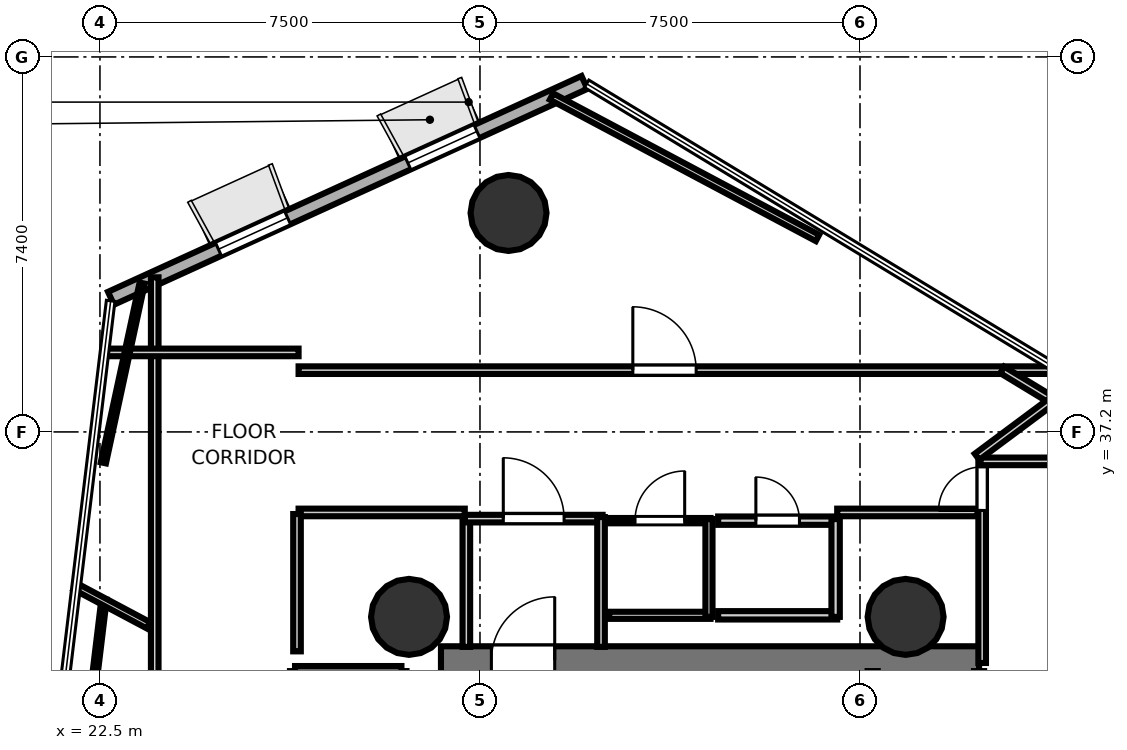
"""IFC4 building model, lengths in metres.
Left out: names, types, materials, properties, quantities, classifications, styles, units other than length and angle.
Written with IfcOpenShell. Run it as: python <this file> out.ifc"""

import sys

from ifc_helpers import new_model, si_unit, direction, frame, frame_2d, origin, origin_2d, place, context, subcontext, project, spatial, rectangle, hollow_circle, extrude, element, fill, save


model = new_model("IFC4")
c1 = context("Model", 3, precision=1e-05, world=origin(), true_north=direction((0.0, 1.0)))
c2 = subcontext(c1, "Body", "Model", "MODEL_VIEW")
j1 = project(units=[si_unit("LENGTHUNIT", "METRE"), si_unit("PLANEANGLEUNIT", "RADIAN")], contexts=[c1])
p1 = place(None, origin())
s1 = spatial("IfcSite", under=j1, at=p1, CompositionType="ELEMENT")
p2 = place(p1, origin())
s2 = spatial("IfcBuilding", under=s1, at=p2, CompositionType="ELEMENT")
p3 = place(p2, frame((0.0, 0.0, 116.3)))
s3 = spatial("IfcBuildingStorey", under=s2, at=p3, CompositionType="ELEMENT", Elevation=116.3)
p4 = place(p3, frame((29.23, 32.695, 0.0), z_axis=(0.0, 0.0, 1.0), x_axis=(1.0, 0.0, 0.0)))
e1 = element("IfcWall", 1, at=p4, inside=s3, PredefinedType="SHEAR", context=c2, shape_type="SweptSolid", body=[
    extrude(rectangle(XDim=10.62, YDim=0.55, at=frame_2d((5.31, 0.0))), origin(), (0.0, 0.0, 1.0), 3.52),
])
p5 = place(p4, frame((0.995, 0.0, 0.0)))
e2 = element("IfcOpeningElement", 2, at=p5, cuts=e1, PredefinedType="OPENING", context=c2, shape_type="SweptSolid", body=[
    extrude(rectangle(XDim=1.25, YDim=2.15, at=frame_2d((0.625, 1.075))), frame((0.0, 0.285, 0.0), z_axis=(0.0, -1.0, 0.0), x_axis=(1.0, 0.0, 0.0)), (0.0, 0.0, 1.0), 0.57),
])
for number, where, z_axis, x_axis in (
    (3, (28.6, 33.55, 0.0), (0.0, 0.0, 1.0), (1.0, 0.0, 0.0)),
    (4, (38.4, 33.55, 0.0), (0.0, 0.0, 1.0), (1.0, 0.0, 0.0)),
    (5, (30.564, 41.521, 0.0), (0.0, 0.0, 1.0), (1.0, 0.0, 0.0)),
):
    element("IfcColumn", number, at=place(p3, frame(where, z_axis=z_axis, x_axis=x_axis)), inside=s3, PredefinedType="COLUMN", context=c2, shape_type="SweptSolid", body=[
        extrude(hollow_circle(Radius=0.75, WallThickness=0.036, at=origin_2d()), origin(), (0.0, 0.0, 1.0), 3.7),
    ])
p6 = place(p3, frame((32.062, 44.097, 0.0), z_axis=(0.0, 0.0, 1.0), x_axis=(-0.909919805149, -0.414784218838, 0.0)))
e6 = element("IfcWall", 6, at=p6, inside=s3, PredefinedType="SOLIDWALL", context=c2, shape_type="SweptSolid", body=[
    extrude(rectangle(XDim=10.27, YDim=0.28, at=frame_2d((5.135, 0.0))), origin(), (0.0, 0.0, 1.0), 3.52),
])
p7 = place(p6, frame((2.331, 0.0, 0.85)))
e7 = element("IfcOpeningElement", 7, at=p7, cuts=e6, PredefinedType="OPENING", context=c2, shape_type="SweptSolid", body=[
    extrude(rectangle(XDim=1.5, YDim=2.1, at=frame_2d((0.75, 1.05))), frame((0.0, 0.15, 0.0), z_axis=(0.0, -1.0, 0.0), x_axis=(1.0, 0.0, 0.0)), (0.0, 0.0, 1.0), 0.3),
])
p8 = place(p6, frame((6.439, 0.0, 0.85)))
e8 = element("IfcOpeningElement", 8, at=p8, cuts=e6, PredefinedType="OPENING", context=c2, shape_type="SweptSolid", body=[
    extrude(rectangle(XDim=1.5, YDim=2.1, at=frame_2d((0.75, 1.05))), frame((0.0, 0.15, 0.0), z_axis=(0.0, -1.0, 0.0), x_axis=(1.0, 0.0, 0.0)), (0.0, 0.0, 1.0), 0.3),
])
p9 = place(p3, frame((26.35, 32.48, 0.0), z_axis=(0.0, 0.0, 1.0), x_axis=(1.0, 0.0, 0.0)))
e9 = element("IfcWall", 9, at=p9, inside=s3, PredefinedType="SOLIDWALL", context=c2, shape_type="SweptSolid", body=[
    extrude(rectangle(XDim=2.1, YDim=0.2, at=frame_2d((1.05, 0.0))), origin(), (0.0, 0.0, 1.0), 3.52),
])
p10 = place(p3, frame((29.731, 32.958, 0.0), z_axis=(0.0, 0.0, 1.0), x_axis=(0.0, 1.0, 0.0)))
e10 = element("IfcWall", 10, at=p10, inside=s3, PredefinedType="PARTITIONING", context=c2, shape_type="SweptSolid", body=[
    extrude(rectangle(XDim=2.562, YDim=0.15, at=frame_2d((1.281, 0.0))), origin(), (0.0, 0.0, 1.0), 2.84),
])
p11 = place(p3, frame((29.7, 35.489, 0.0), z_axis=(0.0, 0.0, 1.0), x_axis=(1.0, 0.0, 0.0)))
e11 = element("IfcWall", 11, at=p11, inside=s3, PredefinedType="PARTITIONING", context=c2, shape_type="SweptSolid", body=[
    extrude(rectangle(XDim=2.72, YDim=0.15, at=frame_2d((1.36, 0.0))), origin(), (0.0, 0.0, 1.0), 2.84),
])
p12 = place(p11, frame((0.76, 0.0, 0.0)))
e12 = element("IfcOpeningElement", 12, at=p12, cuts=e11, PredefinedType="OPENING", context=c2, shape_type="SweptSolid", body=[
    extrude(rectangle(XDim=1.2, YDim=2.15, at=frame_2d((0.6, 1.075))), frame((0.0, 0.085, 0.0), z_axis=(0.0, -1.0, 0.0), x_axis=(1.0, 0.0, 0.0)), (0.0, 0.0, 1.0), 0.17),
])
p13 = place(p3, frame((32.389, 35.52, 0.0), z_axis=(0.0, 0.0, 1.0), x_axis=(0.0, -1.0, 0.0)))
e13 = element("IfcWall", 13, at=p13, inside=s3, PredefinedType="PARTITIONING", context=c2, shape_type="SweptSolid", body=[
    extrude(rectangle(XDim=2.562, YDim=0.15, at=frame_2d((1.281, 0.0))), origin(), (0.0, 0.0, 1.0), 2.84),
])
p14 = place(p3, frame((39.911, 32.64, 0.0), z_axis=(0.0, 0.0, 1.0), x_axis=(0.0, 1.0, 0.0)))
e14 = element("IfcWall", 14, at=p14, inside=s3, PredefinedType="PARTITIONING", context=c2, shape_type="SweptSolid", body=[
    extrude(rectangle(XDim=4.01, YDim=0.15, at=frame_2d((2.005, 0.0))), origin(), (0.0, 0.0, 1.0), 2.84),
])
p15 = place(p14, frame((3.01, 0.0, 0.0)))
e15 = element("IfcOpeningElement", 15, at=p15, cuts=e14, PredefinedType="OPENING", context=c2, shape_type="SweptSolid", body=[
    extrude(rectangle(XDim=0.86, YDim=2.05, at=frame_2d((0.43, 1.025))), frame((0.0, 0.085, 0.0), z_axis=(0.0, -1.0, 0.0), x_axis=(1.0, 0.0, 0.0)), (0.0, 0.0, 1.0), 0.17),
])
p16 = place(p3, frame((39.88, 36.619, 0.0), z_axis=(0.0, 0.0, 1.0), x_axis=(1.0, 0.0, 0.0)))
e16 = element("IfcWall", 16, at=p16, inside=s3, PredefinedType="PARTITIONING", context=c2, shape_type="SweptSolid", body=[
    extrude(rectangle(XDim=4.533, YDim=0.15, at=frame_2d((2.267, 0.0))), origin(), (0.0, 0.0, 1.0), 2.84),
])
p17 = place(p3, frame((34.55, 33.581, 0.0), z_axis=(0.0, 0.0, 1.0), x_axis=(-1.0, 0.0, 0.0)))
e17 = element("IfcWall", 17, at=p17, inside=s3, PredefinedType="PARTITIONING", context=c2, shape_type="SweptSolid", body=[
    extrude(rectangle(XDim=2.0, YDim=0.14, at=frame_2d((1.0, 0.0))), origin(), (0.0, 0.0, 1.0), 2.84),
])
p18 = place(p3, frame((32.55, 35.449, 0.0), z_axis=(0.0, 0.0, 1.0), x_axis=(1.0, 0.0, 0.0)))
e18 = element("IfcWall", 18, at=p18, inside=s3, PredefinedType="PARTITIONING", context=c2, shape_type="SweptSolid", body=[
    extrude(rectangle(XDim=2.0, YDim=0.105, at=frame_2d((1.0, 0.0))), origin(), (0.0, 0.0, 1.0), 2.84),
])
p19 = place(p18, frame((0.51, 0.0, 0.0)))
e19 = element("IfcOpeningElement", 19, at=p19, cuts=e18, PredefinedType="OPENING", context=c2, shape_type="SweptSolid", body=[
    extrude(rectangle(XDim=0.98, YDim=2.1, at=frame_2d((0.49, 1.05))), frame((0.0, 0.062, 0.0), z_axis=(0.0, -1.0, 0.0), x_axis=(1.0, 0.0, 0.0)), (0.0, 0.0, 1.0), 0.125),
])
p20 = place(p3, frame((34.519, 35.48, 0.0), z_axis=(0.0, 0.0, 1.0), x_axis=(0.0, -1.0, 0.0)))
e20 = element("IfcWall", 20, at=p20, inside=s3, PredefinedType="PARTITIONING", context=c2, shape_type="SweptSolid", body=[
    extrude(rectangle(XDim=1.93, YDim=0.14, at=frame_2d((0.965, 0.0))), origin(), (0.0, 0.0, 1.0), 2.84),
])
p21 = place(p3, frame((37.05, 33.581, 0.0), z_axis=(0.0, 0.0, 1.0), x_axis=(-1.0, 0.0, 0.0)))
e21 = element("IfcWall", 21, at=p21, inside=s3, PredefinedType="PLUMBINGWALL", context=c2, shape_type="SweptSolid", body=[
    extrude(rectangle(XDim=2.35, YDim=0.165, at=frame_2d((1.175, 0.0))), origin(), (0.0, 0.0, 1.0), 2.84),
])
p22 = place(p3, frame((34.7, 35.449, 0.0), z_axis=(0.0, 0.0, 1.0), x_axis=(1.0, 0.0, 0.0)))
e22 = element("IfcWall", 22, at=p22, inside=s3, PredefinedType="PLUMBINGWALL", context=c2, shape_type="SweptSolid", body=[
    extrude(rectangle(XDim=2.35, YDim=0.165, at=frame_2d((1.175, 0.0))), origin(), (0.0, 0.0, 1.0), 2.84),
])
p23 = place(p22, frame((0.745, 0.0, 0.0)))
e23 = element("IfcOpeningElement", 23, at=p23, cuts=e22, PredefinedType="OPENING", context=c2, shape_type="SweptSolid", body=[
    extrude(rectangle(XDim=0.86, YDim=2.05, at=frame_2d((0.43, 1.025))), frame((0.0, 0.093, 0.0), z_axis=(0.0, -1.0, 0.0), x_axis=(1.0, 0.0, 0.0)), (0.0, 0.0, 1.0), 0.185),
])
p24 = place(p3, frame((37.019, 35.48, 0.0), z_axis=(0.0, 0.0, 1.0), x_axis=(0.0, -1.0, 0.0)))
e24 = element("IfcWall", 24, at=p24, inside=s3, PredefinedType="PLUMBINGWALL", context=c2, shape_type="SweptSolid", body=[
    extrude(rectangle(XDim=1.93, YDim=0.165, at=frame_2d((0.965, 0.0))), origin(), (0.0, 0.0, 1.0), 2.84),
])
p25 = place(p3, frame((23.581, 28.307, 0.0), z_axis=(0.0, 0.0, 1.0), x_axis=(0.0, 1.0, 0.0)))
e25 = element("IfcWall", 25, at=p25, inside=s3, PredefinedType="PARTITIONING", context=c2, shape_type="SweptSolid", body=[
    extrude(rectangle(XDim=11.944, YDim=0.15, at=frame_2d((5.972, 0.0))), origin(), (0.0, 0.0, 1.0), 2.84),
])
p26 = place(p3, frame((22.569, 38.769, 0.0), z_axis=(0.0, 0.0, 1.0), x_axis=(1.0, 0.0, 0.0)))
e26 = element("IfcWall", 26, at=p26, inside=s3, PredefinedType="PARTITIONING", context=c2, shape_type="SweptSolid", body=[
    extrude(rectangle(XDim=3.851, YDim=0.15, at=frame_2d((1.926, 0.0))), origin(), (0.0, 0.0, 1.0), 2.84),
])
p27 = place(p3, frame((26.42, 38.419, 0.0), z_axis=(0.0, 0.0, 1.0), x_axis=(1.0, 0.0, 0.0)))
e27 = element("IfcWall", 27, at=p27, inside=s3, PredefinedType="PARTITIONING", context=c2, shape_type="SweptSolid", body=[
    extrude(rectangle(XDim=15.025, YDim=0.15, at=frame_2d((7.513, 0.0))), origin(), (0.0, 0.0, 1.0), 2.84),
])
p28 = place(p27, frame((6.597, 0.0, 0.0)))
e28 = element("IfcOpeningElement", 28, at=p28, cuts=e27, PredefinedType="OPENING", context=c2, shape_type="SweptSolid", body=[
    extrude(rectangle(XDim=1.25, YDim=2.2, at=frame_2d((0.625, 1.1))), frame((0.0, 0.085, 0.0), z_axis=(0.0, -1.0, 0.0), x_axis=(1.0, 0.0, 0.0)), (0.0, 0.0, 1.0), 0.17),
])
p29 = place(p3, frame((40.307, 38.424, 0.0), z_axis=(0.0, 0.0, 1.0), x_axis=(0.855008040292, -0.518614742401, 0.0)))
e29 = element("IfcWall", 29, at=p29, inside=s3, PredefinedType="PARTITIONING", context=c2, shape_type="SweptSolid", body=[
    extrude(rectangle(XDim=1.21, YDim=0.15, at=frame_2d((0.605, 0.0))), origin(), (0.0, 0.0, 1.0), 2.84),
])
p30 = place(p3, frame((41.816, 38.203, 0.0), z_axis=(0.0, 0.0, 1.0), x_axis=(-0.802067975303, -0.597232754454, 0.0)))
e30 = element("IfcWall", 30, at=p30, inside=s3, PredefinedType="PARTITIONING", context=c2, shape_type="SweptSolid", body=[
    extrude(rectangle(XDim=2.502, YDim=0.15, at=frame_2d((1.251, 0.0))), origin(), (0.0, 0.0, 1.0), 2.84),
])
p31 = place(p3, frame((39.818, 35.611, 0.0), z_axis=(0.0, 0.0, 1.0), x_axis=(-1.0, 0.0, 0.0)))
e31 = element("IfcWall", 31, at=p31, inside=s3, PredefinedType="PARTITIONING", context=c2, shape_type="SweptSolid", body=[
    extrude(rectangle(XDim=2.768, YDim=0.15, at=frame_2d((1.384, 0.0))), origin(), (0.0, 0.0, 1.0), 2.84),
])
p32 = place(p3, frame((29.7, 35.611, 0.0), z_axis=(0.0, 0.0, 1.0), x_axis=(-1.0, 0.0, 0.0)))
e32 = element("IfcWall", 32, at=p32, inside=s3, PredefinedType="PARTITIONING", context=c2, shape_type="SweptSolid", body=[
    extrude(rectangle(XDim=3.28, YDim=0.15, at=frame_2d((1.64, 0.0))), origin(), (0.0, 0.0, 1.0), 2.84),
])
p33 = place(p3, frame((26.389, 35.58, 0.0), z_axis=(0.0, 0.0, 1.0), x_axis=(0.0, -1.0, 0.0)))
e33 = element("IfcWall", 33, at=p33, inside=s3, PredefinedType="PARTITIONING", context=c2, shape_type="SweptSolid", body=[
    extrude(rectangle(XDim=2.71, YDim=0.15, at=frame_2d((1.355, 0.0))), origin(), (0.0, 0.0, 1.0), 2.84),
])
p34 = place(p3, frame((20.443, 16.179, 0.0), z_axis=(0.0, 0.0, 1.0), x_axis=(0.11977901292, 0.992800578195, 0.0)))
e34 = element("IfcWall", 34, at=p34, inside=s3, PredefinedType="PARTITIONING", context=c2, shape_type="SweptSolid", body=[
    extrude(rectangle(XDim=17.847, YDim=0.105, at=frame_2d((8.923, 0.0))), origin(), (0.0, 0.0, 1.0), 2.84),
])
p35 = place(p3, frame((22.013, 34.152, 0.0), z_axis=(0.0, 0.0, 1.0), x_axis=(0.882939604617, -0.469486586175, 0.0)))
e35 = element("IfcWall", 35, at=p35, inside=s3, PredefinedType="PARTITIONING", context=c2, shape_type="SweptSolid", body=[
    extrude(rectangle(XDim=1.634, YDim=0.14, at=frame_2d((0.817, 0.0))), origin(), (0.0, 0.0, 1.0), 2.84),
])
p36 = place(p3, frame((31.412, 43.819, 0.0), z_axis=(0.0, 0.0, 1.0), x_axis=(0.882926360829, -0.469511492249, 0.0)))
e36 = element("IfcWall", 36, at=p36, inside=s3, PredefinedType="PARTITIONING", context=c2, shape_type="SweptSolid", body=[
    extrude(rectangle(XDim=5.945, YDim=0.14, at=frame_2d((2.973, 0.0))), origin(), (0.0, 0.0, 1.0), 2.84),
])
p37 = place(p3, frame((22.567, 36.59, 0.0), z_axis=(0.0, 0.0, 1.0), x_axis=(0.211164306242, 0.977450579707, 0.0)))
e37 = element("IfcWall", 37, at=p37, inside=s3, PredefinedType="PARTITIONING", context=c2, shape_type="SweptSolid", body=[
    extrude(rectangle(XDim=3.629, YDim=0.105, at=frame_2d((1.814, 0.0))), origin(), (0.0, 0.0, 1.0), 2.84),
])
p38 = place(p5, origin())
e38 = element("IfcDoor", 38, at=p38, inside=s3, OperationType="SINGLE_SWING_RIGHT", PredefinedType="DOOR", context=c2, shape_type="SweptSolid", body=[
    extrude(rectangle(XDim=1.25, YDim=2.15, at=frame_2d((0.625, 1.075))), frame((0.0, 0.025, 0.0), z_axis=(0.0, -1.0, 0.0), x_axis=(1.0, 0.0, 0.0)), (0.0, 0.0, 1.0), 0.05),
])
fill(e2, e38)
p39 = place(p12, origin())
e39 = element("IfcDoor", 39, at=p39, inside=s3, OperationType="SINGLE_SWING_LEFT", PredefinedType="DOOR", context=c2, shape_type="SweptSolid", body=[
    extrude(rectangle(XDim=1.2, YDim=2.15, at=frame_2d((0.6, 1.075))), frame((0.0, 0.025, 0.0), z_axis=(0.0, -1.0, 0.0), x_axis=(1.0, 0.0, 0.0)), (0.0, 0.0, 1.0), 0.05),
])
fill(e12, e39)
p40 = place(p15, origin())
e40 = element("IfcDoor", 40, at=p40, inside=s3, OperationType="SINGLE_SWING_LEFT", PredefinedType="DOOR", context=c2, shape_type="SweptSolid", body=[
    extrude(rectangle(XDim=0.86, YDim=2.05, at=frame_2d((0.43, 1.025))), frame((0.0, 0.025, 0.0), z_axis=(0.0, -1.0, 0.0), x_axis=(1.0, 0.0, 0.0)), (0.0, 0.0, 1.0), 0.05),
])
fill(e15, e40)
p41 = place(p19, origin())
e41 = element("IfcDoor", 41, at=p41, inside=s3, OperationType="SINGLE_SWING_RIGHT", PredefinedType="DOOR", context=c2, shape_type="SweptSolid", body=[
    extrude(rectangle(XDim=0.98, YDim=2.1, at=frame_2d((0.49, 1.05))), frame((0.0, 0.025, 0.0), z_axis=(0.0, -1.0, 0.0), x_axis=(1.0, 0.0, 0.0)), (0.0, 0.0, 1.0), 0.05),
])
fill(e19, e41)
p42 = place(p23, origin())
e42 = element("IfcDoor", 42, at=p42, inside=s3, OperationType="SINGLE_SWING_LEFT", PredefinedType="DOOR", context=c2, shape_type="SweptSolid", body=[
    extrude(rectangle(XDim=0.86, YDim=2.05, at=frame_2d((0.43, 1.025))), frame((0.0, 0.025, 0.0), z_axis=(0.0, -1.0, 0.0), x_axis=(1.0, 0.0, 0.0)), (0.0, 0.0, 1.0), 0.05),
])
fill(e23, e42)
p43 = place(p28, origin())
e43 = element("IfcDoor", 43, at=p43, inside=s3, OperationType="SINGLE_SWING_LEFT", PredefinedType="DOOR", context=c2, shape_type="SweptSolid", body=[
    extrude(rectangle(XDim=1.25, YDim=2.2, at=frame_2d((0.625, 1.1))), frame((0.0, 0.025, 0.0), z_axis=(0.0, -1.0, 0.0), x_axis=(1.0, 0.0, 0.0)), (0.0, 0.0, 1.0), 0.05),
])
fill(e28, e43)
p44 = place(p7, origin())
e44 = element("IfcWindow", 44, at=p44, inside=s3, PartitioningType="SINGLE_PANEL", PredefinedType="WINDOW", context=c2, shape_type="SweptSolid", body=[
    extrude(rectangle(XDim=1.5, YDim=2.1, at=frame_2d((0.75, 1.05))), frame((0.0, 0.03, 0.0), z_axis=(0.0, -1.0, 0.0), x_axis=(1.0, 0.0, 0.0)), (0.0, 0.0, 1.0), 0.06),
])
fill(e7, e44)
p45 = place(p8, origin())
e45 = element("IfcWindow", 45, at=p45, inside=s3, PartitioningType="SINGLE_PANEL", PredefinedType="WINDOW", context=c2, shape_type="SweptSolid", body=[
    extrude(rectangle(XDim=1.5, YDim=2.1, at=frame_2d((0.75, 1.05))), frame((0.0, 0.03, 0.0), z_axis=(0.0, -1.0, 0.0), x_axis=(1.0, 0.0, 0.0)), (0.0, 0.0, 1.0), 0.06),
])
fill(e8, e45)
save(model, sys.argv[1])
